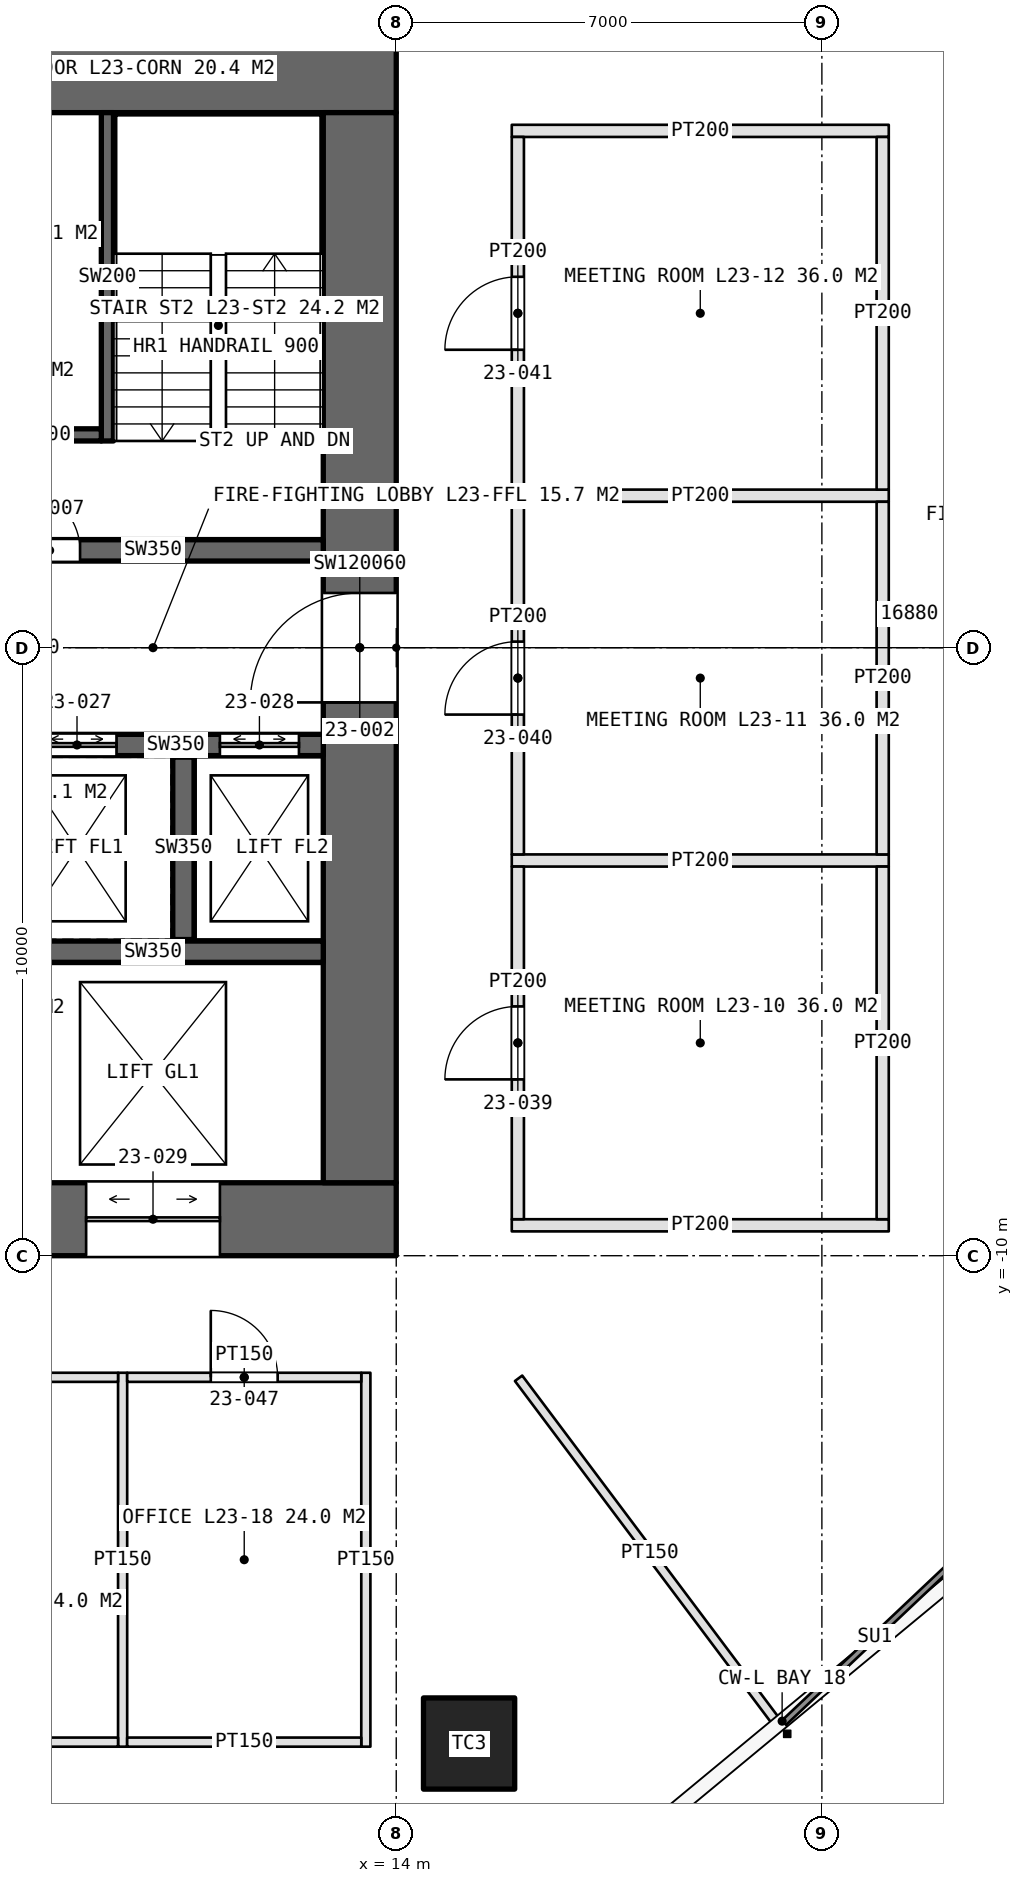
"""IFC4 building model, lengths in metres.
Left out: names, types, materials, properties, quantities, classifications, styles, units other than length and angle.
Written with IfcOpenShell. Run it as: python <this file> out.ifc"""

import sys

from ifc_helpers import new_model, si_unit, direction, frame, frame_2d, origin, origin_2d, place, context, subcontext, project, spatial, rectangle, extrude, element, fill, save


model = new_model("IFC4")
c1 = context("Model", 3, precision=1e-05, world=origin(), true_north=direction((0.0, 1.0)))
c2 = subcontext(c1, "Body", "Model", "MODEL_VIEW")
j1 = project(units=[si_unit("LENGTHUNIT", "METRE"), si_unit("PLANEANGLEUNIT", "RADIAN")], contexts=[c1])
p1 = place(None, origin())
s1 = spatial("IfcSite", under=j1, at=p1, CompositionType="ELEMENT")
p2 = place(p1, origin())
s2 = spatial("IfcBuilding", under=s1, at=p2, CompositionType="ELEMENT")
p3 = place(p2, frame((0.0, 0.0, 113.4)))
s3 = spatial("IfcBuildingStorey", under=s2, at=p3, CompositionType="ELEMENT", Elevation=113.4)
p4 = place(p3, frame((-14.0, -9.4, 0.0), z_axis=(0.0, 0.0, 1.0), x_axis=(1.0, 0.0, 0.0)))
e1 = element("IfcWall", 1, at=p4, inside=s3, PredefinedType="SHEAR", context=c2, shape_type="SweptSolid", body=[
    extrude(rectangle(XDim=28.0, YDim=1.2, at=frame_2d((14.0, 0.0))), origin(), (0.0, 0.0, 1.0), 4.2),
])
p5 = place(p4, frame((13.1, 0.0, 0.0)))
e2 = element("IfcOpeningElement", 2, at=p5, cuts=e1, PredefinedType="OPENING", context=c2, shape_type="SweptSolid", body=[
    extrude(rectangle(XDim=1.8, YDim=2.4, at=frame_2d((0.9, 1.2))), frame((0.0, 0.61, 0.0), z_axis=(0.0, -1.0, 0.0), x_axis=(1.0, 0.0, 0.0)), (0.0, 0.0, 1.0), 1.22),
])
p6 = place(p4, frame((22.9, 0.0, 0.0)))
e3 = element("IfcOpeningElement", 3, at=p6, cuts=e1, PredefinedType="OPENING", context=c2, shape_type="SweptSolid", body=[
    extrude(rectangle(XDim=2.2, YDim=2.7, at=frame_2d((1.1, 1.35))), frame((0.0, 0.61, 0.0), z_axis=(0.0, -1.0, 0.0), x_axis=(1.0, 0.0, 0.0)), (0.0, 0.0, 1.0), 1.22),
])
p7 = place(p3, frame((14.0, 9.4, 0.0), z_axis=(0.0, 0.0, 1.0), x_axis=(-1.0, 0.0, 0.0)))
e4 = element("IfcWall", 4, at=p7, inside=s3, PredefinedType="SHEAR", context=c2, shape_type="SweptSolid", body=[
    extrude(rectangle(XDim=28.0, YDim=1.2, at=frame_2d((14.0, 0.0))), origin(), (0.0, 0.0, 1.0), 4.2),
])
p8 = place(p7, frame((24.0, 0.0, 0.0)))
e5 = element("IfcOpeningElement", 5, at=p8, cuts=e4, PredefinedType="OPENING", context=c2, shape_type="SweptSolid", body=[
    extrude(rectangle(XDim=1.0, YDim=2.4, at=frame_2d((0.5, 1.2))), frame((0.0, 0.61, 0.0), z_axis=(0.0, -1.0, 0.0), x_axis=(1.0, 0.0, 0.0)), (0.0, 0.0, 1.0), 1.22),
])
p9 = place(p7, frame((13.1, 0.0, 0.0)))
e6 = element("IfcOpeningElement", 6, at=p9, cuts=e4, PredefinedType="OPENING", context=c2, shape_type="SweptSolid", body=[
    extrude(rectangle(XDim=1.8, YDim=2.4, at=frame_2d((0.9, 1.2))), frame((0.0, 0.61, 0.0), z_axis=(0.0, -1.0, 0.0), x_axis=(1.0, 0.0, 0.0)), (0.0, 0.0, 1.0), 1.22),
])
p10 = place(p3, frame((13.4, -8.8, 0.0), z_axis=(0.0, 0.0, 1.0), x_axis=(0.0, 1.0, 0.0)))
e7 = element("IfcWall", 7, at=p10, inside=s3, PredefinedType="SHEAR", context=c2, shape_type="SweptSolid", body=[
    extrude(rectangle(XDim=17.6, YDim=1.2, at=frame_2d((8.8, 0.0))), origin(), (0.0, 0.0, 1.0), 4.2),
])
p11 = place(p10, frame((7.9, 0.0, 0.0)))
e8 = element("IfcOpeningElement", 8, at=p11, cuts=e7, PredefinedType="OPENING", context=c2, shape_type="SweptSolid", body=[
    extrude(rectangle(XDim=1.8, YDim=2.4, at=frame_2d((0.9, 1.2))), frame((0.0, 0.61, 0.0), z_axis=(0.0, -1.0, 0.0), x_axis=(1.0, 0.0, 0.0)), (0.0, 0.0, 1.0), 1.22),
])
p12 = place(p3, frame((7.2, 1.6, 0.0), z_axis=(0.0, 0.0, 1.0), x_axis=(1.0, 0.0, 0.0)))
e9 = element("IfcWall", 9, at=p12, inside=s3, PredefinedType="SHEAR", context=c2, shape_type="SweptSolid", body=[
    extrude(rectangle(XDim=5.6, YDim=0.35, at=frame_2d((2.8, 0.0))), origin(), (0.0, 0.0, 1.0), 4.2),
])
p13 = place(p12, frame((0.6, 0.0, 0.0)))
e10 = element("IfcOpeningElement", 10, at=p13, cuts=e9, PredefinedType="OPENING", context=c2, shape_type="SweptSolid", body=[
    extrude(rectangle(XDim=1.0, YDim=2.4, at=frame_2d((0.5, 1.2))), frame((0.0, 0.185, 0.0), z_axis=(0.0, -1.0, 0.0), x_axis=(1.0, 0.0, 0.0)), (0.0, 0.0, 1.0), 0.37),
])
p14 = place(p3, frame((7.2, -1.6, 0.0), z_axis=(0.0, 0.0, 1.0), x_axis=(1.0, 0.0, 0.0)))
e11 = element("IfcWall", 11, at=p14, inside=s3, PredefinedType="SHEAR", context=c2, shape_type="SweptSolid", body=[
    extrude(rectangle(XDim=5.6, YDim=0.35, at=frame_2d((2.8, 0.0))), origin(), (0.0, 0.0, 1.0), 4.2),
])
p15 = place(p14, frame((0.9, 0.0, 0.0)))
e12 = element("IfcOpeningElement", 12, at=p15, cuts=e11, PredefinedType="OPENING", context=c2, shape_type="SweptSolid", body=[
    extrude(rectangle(XDim=1.3, YDim=2.4, at=frame_2d((0.65, 1.2))), frame((0.0, 0.185, 0.0), z_axis=(0.0, -1.0, 0.0), x_axis=(1.0, 0.0, 0.0)), (0.0, 0.0, 1.0), 0.37),
])
p16 = place(p14, frame((3.9, 0.0, 0.0)))
e13 = element("IfcOpeningElement", 13, at=p16, cuts=e11, PredefinedType="OPENING", context=c2, shape_type="SweptSolid", body=[
    extrude(rectangle(XDim=1.3, YDim=2.4, at=frame_2d((0.65, 1.2))), frame((0.0, 0.185, 0.0), z_axis=(0.0, -1.0, 0.0), x_axis=(1.0, 0.0, 0.0)), (0.0, 0.0, 1.0), 0.37),
])
p17 = place(p3, frame((10.5, -4.8, 0.0), z_axis=(0.0, 0.0, 1.0), x_axis=(0.0, 1.0, 0.0)))
e14 = element("IfcWall", 14, at=p17, inside=s3, PredefinedType="SHEAR", context=c2, shape_type="SweptSolid", body=[
    extrude(rectangle(XDim=3.0, YDim=0.35, at=frame_2d((1.5, 0.0))), origin(), (0.0, 0.0, 1.0), 4.2),
])
p18 = place(p3, frame((7.2, -5.0, 0.0), z_axis=(0.0, 0.0, 1.0), x_axis=(1.0, 0.0, 0.0)))
e15 = element("IfcWall", 15, at=p18, inside=s3, PredefinedType="SHEAR", context=c2, shape_type="SweptSolid", body=[
    extrude(rectangle(XDim=5.6, YDim=0.35, at=frame_2d((2.8, 0.0))), origin(), (0.0, 0.0, 1.0), 4.2),
])
p19 = place(p3, frame((15.198, -18.023, 0.0), z_axis=(0.0, 0.0, 1.0), x_axis=(1.0, 0.0, 0.0)))
e16 = element("IfcColumn", 16, at=p19, inside=s3, PredefinedType="COLUMN", context=c2, shape_type="SweptSolid", body=[
    extrude(rectangle(XDim=1.5, YDim=1.5, at=origin_2d()), origin(), (0.0, 0.0, 1.0), 4.2),
])
p20 = place(p3, frame((9.25, 3.4, 0.0), z_axis=(0.0, 0.0, 1.0), x_axis=(0.0, 1.0, 0.0)))
e17 = element("IfcWall", 17, at=p20, inside=s3, PredefinedType="SOLIDWALL", context=c2, shape_type="SweptSolid", body=[
    extrude(rectangle(XDim=5.4, YDim=0.2, at=frame_2d((2.7, 0.0))), origin(), (0.0, 0.0, 1.0), 4.2),
])
p21 = place(p3, frame((9.15, 3.5, 0.0), z_axis=(0.0, 0.0, 1.0), x_axis=(-1.0, 0.0, 0.0)))
e18 = element("IfcWall", 18, at=p21, inside=s3, PredefinedType="SOLIDWALL", context=c2, shape_type="SweptSolid", body=[
    extrude(rectangle(XDim=1.95, YDim=0.2, at=frame_2d((0.975, 0.0))), origin(), (0.0, 0.0, 1.0), 4.2),
])
for number, where, z_axis, x_axis in (
    (19, (15.9, -9.5, 0.0), (0.0, 0.0, 1.0), (1.0, 0.0, 0.0)),
    (20, (15.9, -3.5, 0.0), (0.0, 0.0, 1.0), (1.0, 0.0, 0.0)),
    (21, (15.9, 2.5, 0.0), (0.0, 0.0, 1.0), (1.0, 0.0, 0.0)),
    (22, (15.9, 8.5, 0.0), (0.0, 0.0, 1.0), (1.0, 0.0, 0.0)),
):
    element("IfcWall", number, at=place(p3, frame(where, z_axis=z_axis, x_axis=x_axis)), inside=s3, PredefinedType="PARTITIONING", context=c2, shape_type="SweptSolid", body=[
        extrude(rectangle(XDim=6.2, YDim=0.2, at=frame_2d((3.1, 0.0))), origin(), (0.0, 0.0, 1.0), 3.0),
    ])
p22 = place(p3, frame((16.0, -9.4, 0.0), z_axis=(0.0, 0.0, 1.0), x_axis=(0.0, 1.0, 0.0)))
e23 = element("IfcWall", 23, at=p22, inside=s3, PredefinedType="PARTITIONING", context=c2, shape_type="SweptSolid", body=[
    extrude(rectangle(XDim=5.8, YDim=0.2, at=frame_2d((2.9, 0.0))), origin(), (0.0, 0.0, 1.0), 3.0),
])
p23 = place(p22, frame((2.3, 0.0, 0.0)))
e24 = element("IfcOpeningElement", 24, at=p23, cuts=e23, PredefinedType="OPENING", context=c2, shape_type="SweptSolid", body=[
    extrude(rectangle(XDim=1.2, YDim=2.4, at=frame_2d((0.6, 1.2))), frame((0.0, 0.11, 0.0), z_axis=(0.0, -1.0, 0.0), x_axis=(1.0, 0.0, 0.0)), (0.0, 0.0, 1.0), 0.22),
])
p24 = place(p3, frame((22.0, -9.4, 0.0), z_axis=(0.0, 0.0, 1.0), x_axis=(0.0, 1.0, 0.0)))
e25 = element("IfcWall", 25, at=p24, inside=s3, PredefinedType="PARTITIONING", context=c2, shape_type="SweptSolid", body=[
    extrude(rectangle(XDim=5.8, YDim=0.2, at=frame_2d((2.9, 0.0))), origin(), (0.0, 0.0, 1.0), 3.0),
])
p25 = place(p3, frame((16.0, -3.4, 0.0), z_axis=(0.0, 0.0, 1.0), x_axis=(0.0, 1.0, 0.0)))
e26 = element("IfcWall", 26, at=p25, inside=s3, PredefinedType="PARTITIONING", context=c2, shape_type="SweptSolid", body=[
    extrude(rectangle(XDim=5.8, YDim=0.2, at=frame_2d((2.9, 0.0))), origin(), (0.0, 0.0, 1.0), 3.0),
])
p26 = place(p25, frame((2.3, 0.0, 0.0)))
e27 = element("IfcOpeningElement", 27, at=p26, cuts=e26, PredefinedType="OPENING", context=c2, shape_type="SweptSolid", body=[
    extrude(rectangle(XDim=1.2, YDim=2.4, at=frame_2d((0.6, 1.2))), frame((0.0, 0.11, 0.0), z_axis=(0.0, -1.0, 0.0), x_axis=(1.0, 0.0, 0.0)), (0.0, 0.0, 1.0), 0.22),
])
p27 = place(p3, frame((22.0, -3.4, 0.0), z_axis=(0.0, 0.0, 1.0), x_axis=(0.0, 1.0, 0.0)))
e28 = element("IfcWall", 28, at=p27, inside=s3, PredefinedType="PARTITIONING", context=c2, shape_type="SweptSolid", body=[
    extrude(rectangle(XDim=5.8, YDim=0.2, at=frame_2d((2.9, 0.0))), origin(), (0.0, 0.0, 1.0), 3.0),
])
p28 = place(p3, frame((16.0, 2.6, 0.0), z_axis=(0.0, 0.0, 1.0), x_axis=(0.0, 1.0, 0.0)))
e29 = element("IfcWall", 29, at=p28, inside=s3, PredefinedType="PARTITIONING", context=c2, shape_type="SweptSolid", body=[
    extrude(rectangle(XDim=5.8, YDim=0.2, at=frame_2d((2.9, 0.0))), origin(), (0.0, 0.0, 1.0), 3.0),
])
p29 = place(p28, frame((2.3, 0.0, 0.0)))
e30 = element("IfcOpeningElement", 30, at=p29, cuts=e29, PredefinedType="OPENING", context=c2, shape_type="SweptSolid", body=[
    extrude(rectangle(XDim=1.2, YDim=2.4, at=frame_2d((0.6, 1.2))), frame((0.0, 0.11, 0.0), z_axis=(0.0, -1.0, 0.0), x_axis=(1.0, 0.0, 0.0)), (0.0, 0.0, 1.0), 0.22),
])
p30 = place(p3, frame((22.0, 2.6, 0.0), z_axis=(0.0, 0.0, 1.0), x_axis=(0.0, 1.0, 0.0)))
e31 = element("IfcWall", 31, at=p30, inside=s3, PredefinedType="PARTITIONING", context=c2, shape_type="SweptSolid", body=[
    extrude(rectangle(XDim=5.8, YDim=0.2, at=frame_2d((2.9, 0.0))), origin(), (0.0, 0.0, 1.0), 3.0),
])
for number, where, z_axis, x_axis in (
    (32, (9.5, -11.925, 0.0), (0.0, 0.0, 1.0), (0.0, -1.0, 0.0)),
    (33, (13.5, -11.925, 0.0), (0.0, 0.0, 1.0), (0.0, -1.0, 0.0)),
):
    element("IfcWall", number, at=place(p3, frame(where, z_axis=z_axis, x_axis=x_axis)), inside=s3, PredefinedType="PARTITIONING", context=c2, shape_type="SweptSolid", body=[
        extrude(rectangle(XDim=6.15, YDim=0.15, at=frame_2d((3.075, 0.0))), origin(), (0.0, 0.0, 1.0), 3.0),
    ])
p31 = place(p3, frame((5.575, -12.0, 0.0), z_axis=(0.0, 0.0, 1.0), x_axis=(1.0, 0.0, 0.0)))
e34 = element("IfcWall", 34, at=p31, inside=s3, PredefinedType="PARTITIONING", context=c2, shape_type="SweptSolid", body=[
    extrude(rectangle(XDim=3.85, YDim=0.15, at=frame_2d((1.925, 0.0))), origin(), (0.0, 0.0, 1.0), 3.0),
])
p32 = place(p31, frame((1.375, 0.0, 0.0)))
e35 = element("IfcOpeningElement", 35, at=p32, cuts=e34, PredefinedType="OPENING", context=c2, shape_type="SweptSolid", body=[
    extrude(rectangle(XDim=1.1, YDim=2.3, at=frame_2d((0.55, 1.15))), frame((0.0, 0.085, 0.0), z_axis=(0.0, -1.0, 0.0), x_axis=(1.0, 0.0, 0.0)), (0.0, 0.0, 1.0), 0.17),
])
p33 = place(p3, frame((5.575, -18.0, 0.0), z_axis=(0.0, 0.0, 1.0), x_axis=(1.0, 0.0, 0.0)))
e36 = element("IfcWall", 36, at=p33, inside=s3, PredefinedType="PARTITIONING", context=c2, shape_type="SweptSolid", body=[
    extrude(rectangle(XDim=3.85, YDim=0.15, at=frame_2d((1.925, 0.0))), origin(), (0.0, 0.0, 1.0), 3.0),
])
p34 = place(p3, frame((9.575, -12.0, 0.0), z_axis=(0.0, 0.0, 1.0), x_axis=(1.0, 0.0, 0.0)))
e37 = element("IfcWall", 37, at=p34, inside=s3, PredefinedType="PARTITIONING", context=c2, shape_type="SweptSolid", body=[
    extrude(rectangle(XDim=3.85, YDim=0.15, at=frame_2d((1.925, 0.0))), origin(), (0.0, 0.0, 1.0), 3.0),
])
p35 = place(p34, frame((1.375, 0.0, 0.0)))
e38 = element("IfcOpeningElement", 38, at=p35, cuts=e37, PredefinedType="OPENING", context=c2, shape_type="SweptSolid", body=[
    extrude(rectangle(XDim=1.1, YDim=2.3, at=frame_2d((0.55, 1.15))), frame((0.0, 0.085, 0.0), z_axis=(0.0, -1.0, 0.0), x_axis=(1.0, 0.0, 0.0)), (0.0, 0.0, 1.0), 0.17),
])
p36 = place(p3, frame((9.575, -18.0, 0.0), z_axis=(0.0, 0.0, 1.0), x_axis=(1.0, 0.0, 0.0)))
e39 = element("IfcWall", 39, at=p36, inside=s3, PredefinedType="PARTITIONING", context=c2, shape_type="SweptSolid", body=[
    extrude(rectangle(XDim=3.85, YDim=0.15, at=frame_2d((1.925, 0.0))), origin(), (0.0, 0.0, 1.0), 3.0),
])
p37 = place(p3, frame((16.012, -12.016, 0.0), z_axis=(0.0, 0.0, 1.0), x_axis=(0.600059749679, -0.799955184254, 0.0)))
e40 = element("IfcWall", 40, at=p37, inside=s3, PredefinedType="PARTITIONING", context=c2, shape_type="SweptSolid", body=[
    extrude(rectangle(XDim=7.191, YDim=0.15, at=frame_2d((3.596, 0.0))), origin(), (0.0, 0.0, 1.0), 3.0),
])
p38 = place(p11, origin())
e41 = element("IfcDoor", 41, at=p38, inside=s3, OperationType="DOUBLE_DOOR_SINGLE_SWING", PredefinedType="DOOR", context=c2, shape_type="SweptSolid", body=[
    extrude(rectangle(XDim=1.8, YDim=2.4, at=frame_2d((0.9, 1.2))), frame((0.0, 0.025, 0.0), z_axis=(0.0, -1.0, 0.0), x_axis=(1.0, 0.0, 0.0)), (0.0, 0.0, 1.0), 0.05),
])
fill(e8, e41)
p39 = place(p13, origin())
e42 = element("IfcDoor", 42, at=p39, inside=s3, OperationType="SINGLE_SWING_LEFT", PredefinedType="DOOR", context=c2, shape_type="SweptSolid", body=[
    extrude(rectangle(XDim=1.0, YDim=2.4, at=frame_2d((0.5, 1.2))), frame((0.0, 0.025, 0.0), z_axis=(0.0, -1.0, 0.0), x_axis=(1.0, 0.0, 0.0)), (0.0, 0.0, 1.0), 0.05),
])
fill(e10, e42)
p40 = place(p15, origin())
e43 = element("IfcDoor", 43, at=p40, inside=s3, OperationType="DOUBLE_DOOR_SLIDING", PredefinedType="DOOR", context=c2, shape_type="SweptSolid", body=[
    extrude(rectangle(XDim=1.3, YDim=2.4, at=frame_2d((0.65, 1.2))), frame((0.0, 0.025, 0.0), z_axis=(0.0, -1.0, 0.0), x_axis=(1.0, 0.0, 0.0)), (0.0, 0.0, 1.0), 0.05),
])
fill(e12, e43)
p41 = place(p16, origin())
e44 = element("IfcDoor", 44, at=p41, inside=s3, OperationType="DOUBLE_DOOR_SLIDING", PredefinedType="DOOR", context=c2, shape_type="SweptSolid", body=[
    extrude(rectangle(XDim=1.3, YDim=2.4, at=frame_2d((0.65, 1.2))), frame((0.0, 0.025, 0.0), z_axis=(0.0, -1.0, 0.0), x_axis=(1.0, 0.0, 0.0)), (0.0, 0.0, 1.0), 0.05),
])
fill(e13, e44)
p42 = place(p6, origin())
e45 = element("IfcDoor", 45, at=p42, inside=s3, OperationType="DOUBLE_DOOR_SLIDING", PredefinedType="DOOR", context=c2, shape_type="SweptSolid", body=[
    extrude(rectangle(XDim=2.2, YDim=2.7, at=frame_2d((1.1, 1.35))), frame((0.0, 0.025, 0.0), z_axis=(0.0, -1.0, 0.0), x_axis=(1.0, 0.0, 0.0)), (0.0, 0.0, 1.0), 0.05),
])
fill(e3, e45)
p43 = place(p23, origin())
e46 = element("IfcDoor", 46, at=p43, inside=s3, OperationType="SINGLE_SWING_LEFT", PredefinedType="DOOR", context=c2, shape_type="SweptSolid", body=[
    extrude(rectangle(XDim=1.2, YDim=2.4, at=frame_2d((0.6, 1.2))), frame((0.0, 0.025, 0.0), z_axis=(0.0, -1.0, 0.0), x_axis=(1.0, 0.0, 0.0)), (0.0, 0.0, 1.0), 0.05),
])
fill(e24, e46)
p44 = place(p26, origin())
e47 = element("IfcDoor", 47, at=p44, inside=s3, OperationType="SINGLE_SWING_LEFT", PredefinedType="DOOR", context=c2, shape_type="SweptSolid", body=[
    extrude(rectangle(XDim=1.2, YDim=2.4, at=frame_2d((0.6, 1.2))), frame((0.0, 0.025, 0.0), z_axis=(0.0, -1.0, 0.0), x_axis=(1.0, 0.0, 0.0)), (0.0, 0.0, 1.0), 0.05),
])
fill(e27, e47)
p45 = place(p29, origin())
e48 = element("IfcDoor", 48, at=p45, inside=s3, OperationType="SINGLE_SWING_LEFT", PredefinedType="DOOR", context=c2, shape_type="SweptSolid", body=[
    extrude(rectangle(XDim=1.2, YDim=2.4, at=frame_2d((0.6, 1.2))), frame((0.0, 0.025, 0.0), z_axis=(0.0, -1.0, 0.0), x_axis=(1.0, 0.0, 0.0)), (0.0, 0.0, 1.0), 0.05),
])
fill(e30, e48)
p46 = place(p35, origin())
e49 = element("IfcDoor", 49, at=p46, inside=s3, OperationType="SINGLE_SWING_LEFT", PredefinedType="DOOR", context=c2, shape_type="SweptSolid", body=[
    extrude(rectangle(XDim=1.1, YDim=2.3, at=frame_2d((0.55, 1.15))), frame((0.0, 0.025, 0.0), z_axis=(0.0, -1.0, 0.0), x_axis=(1.0, 0.0, 0.0)), (0.0, 0.0, 1.0), 0.05),
])
fill(e38, e49)
save(model, sys.argv[1])
